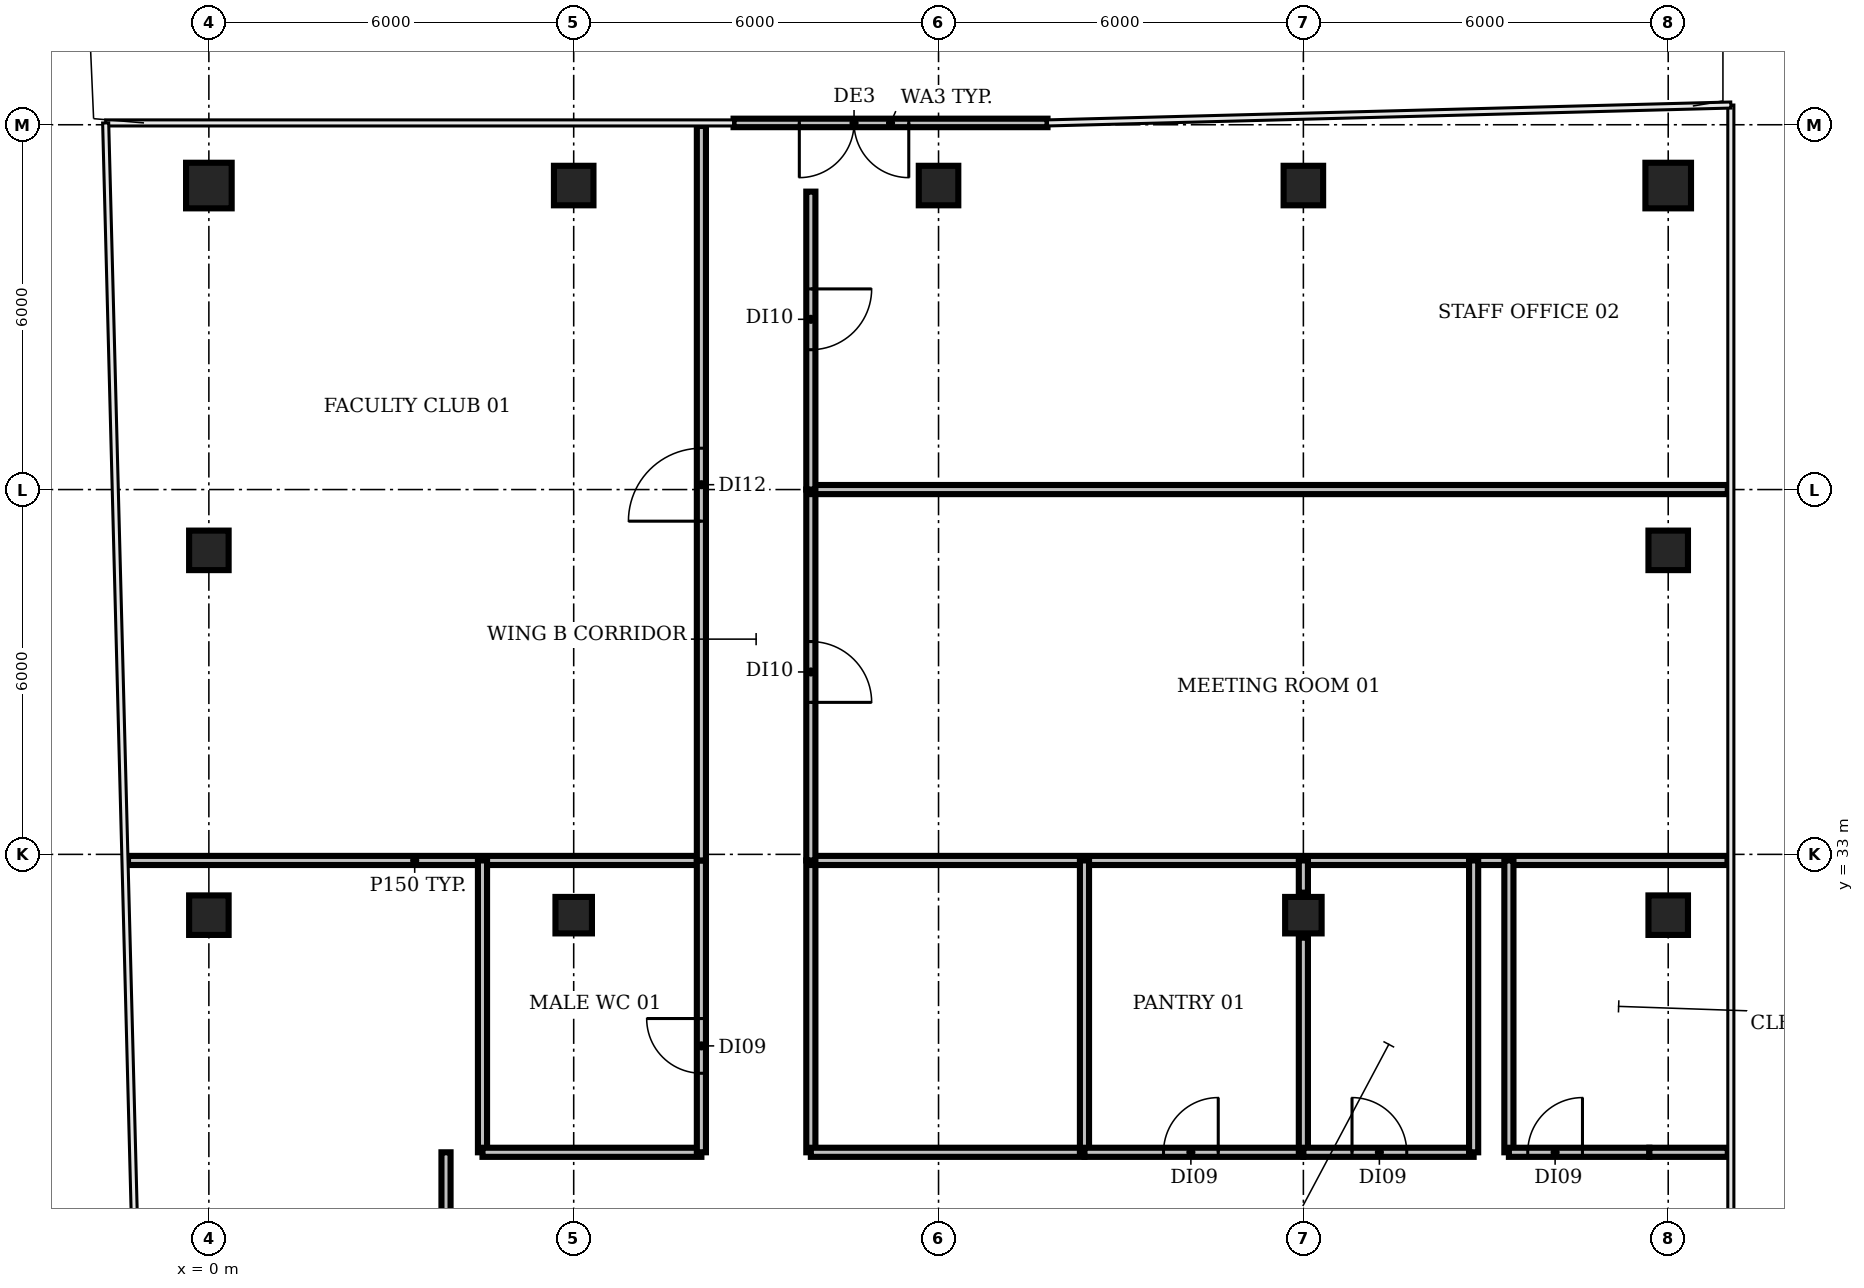
"""IFC4 building model, lengths in metres.
Left out: names, types, materials, properties, quantities, classifications, styles, units other than length and angle.
Written with IfcOpenShell. Run it as: python <this file> out.ifc"""

import sys

from ifc_helpers import new_model, si_unit, direction, frame, frame_2d, origin, origin_2d, place, context, subcontext, project, spatial, rectangle, circle, extrude, element, fill, save


model = new_model("IFC4")
c1 = context("Model", 3, precision=1e-05, world=origin(), true_north=direction((0.0, 1.0)))
c2 = subcontext(c1, "Body", "Model", "MODEL_VIEW")
j1 = project(units=[si_unit("LENGTHUNIT", "METRE"), si_unit("PLANEANGLEUNIT", "RADIAN")], contexts=[c1])
p1 = place(None, origin())
s1 = spatial("IfcSite", under=j1, at=p1, CompositionType="ELEMENT")
p2 = place(p1, origin())
s2 = spatial("IfcBuilding", under=s1, at=p2, CompositionType="ELEMENT")
p3 = place(p2, frame((0.0, 0.0, 327.2)))
s3 = spatial("IfcBuildingStorey", under=s2, at=p3, CompositionType="ELEMENT", Elevation=327.2)
for number, where, z_axis, x_axis in (
    (1, (0.0, 32.0, 0.0), (0.0, 0.0, 1.0), (1.0, 0.0, 0.0)),
    (2, (0.0, 38.0, 0.0), (0.0, 0.0, 1.0), (1.0, 0.0, 0.0)),
):
    element("IfcColumn", number, at=place(p3, frame(where, z_axis=z_axis, x_axis=x_axis)), inside=s3, PredefinedType="COLUMN", context=c2, shape_type="SweptSolid", body=[
        extrude(rectangle(XDim=0.65, YDim=0.65, at=origin_2d()), origin(), (0.0, 0.0, 1.0), 3.9),
    ])
p4 = place(p3, frame((0.0, 44.0, 0.0), z_axis=(0.0, 0.0, 1.0), x_axis=(1.0, 0.0, 0.0)))
e3 = element("IfcColumn", 3, at=p4, inside=s3, PredefinedType="COLUMN", context=c2, shape_type="SweptSolid", body=[
    extrude(circle(Radius=0.375, at=origin_2d()), origin(), (0.0, 0.0, 1.0), 3.9),
])
p5 = place(p3, frame((6.0, 32.0, 0.0), z_axis=(0.0, 0.0, 1.0), x_axis=(1.0, 0.0, 0.0)))
e4 = element("IfcColumn", 4, at=p5, inside=s3, PredefinedType="COLUMN", context=c2, shape_type="SweptSolid", body=[
    extrude(rectangle(XDim=0.6, YDim=0.6, at=origin_2d()), origin(), (0.0, 0.0, 1.0), 3.9),
])
for number, where, z_axis, x_axis in (
    (5, (6.0, 44.0, 0.0), (0.0, 0.0, 1.0), (1.0, 0.0, 0.0)),
    (6, (12.0, 44.0, 0.0), (0.0, 0.0, 1.0), (1.0, 0.0, 0.0)),
):
    element("IfcColumn", number, at=place(p3, frame(where, z_axis=z_axis, x_axis=x_axis)), inside=s3, PredefinedType="COLUMN", context=c2, shape_type="SweptSolid", body=[
        extrude(rectangle(XDim=0.65, YDim=0.65, at=origin_2d()), origin(), (0.0, 0.0, 1.0), 3.9),
    ])
p6 = place(p3, frame((18.0, 32.0, 0.0), z_axis=(0.0, 0.0, 1.0), x_axis=(1.0, 0.0, 0.0)))
e7 = element("IfcColumn", 7, at=p6, inside=s3, PredefinedType="COLUMN", context=c2, shape_type="SweptSolid", body=[
    extrude(rectangle(XDim=0.6, YDim=0.6, at=origin_2d()), origin(), (0.0, 0.0, 1.0), 3.9),
])
for number, where, z_axis, x_axis in (
    (8, (18.0, 44.0, 0.0), (0.0, 0.0, 1.0), (1.0, 0.0, 0.0)),
    (9, (24.0, 32.0, 0.0), (0.0, 0.0, 1.0), (1.0, 0.0, 0.0)),
    (10, (24.0, 38.0, 0.0), (0.0, 0.0, 1.0), (1.0, 0.0, 0.0)),
):
    element("IfcColumn", number, at=place(p3, frame(where, z_axis=z_axis, x_axis=x_axis)), inside=s3, PredefinedType="COLUMN", context=c2, shape_type="SweptSolid", body=[
        extrude(rectangle(XDim=0.65, YDim=0.65, at=origin_2d()), origin(), (0.0, 0.0, 1.0), 3.9),
    ])
p7 = place(p3, frame((24.0, 44.0, 0.0), z_axis=(0.0, 0.0, 1.0), x_axis=(1.0, 0.0, 0.0)))
e11 = element("IfcColumn", 11, at=p7, inside=s3, PredefinedType="COLUMN", context=c2, shape_type="SweptSolid", body=[
    extrude(circle(Radius=0.375, at=origin_2d()), origin(), (0.0, 0.0, 1.0), 3.9),
])
p8 = place(p3, frame((13.792, 45.03, 0.0), z_axis=(0.0, 0.0, 1.0), x_axis=(-1.0, 0.0, 0.0)))
e12 = element("IfcWall", 12, at=p8, inside=s3, PredefinedType="SOLIDWALL", context=c2, shape_type="SweptSolid", body=[
    extrude(rectangle(XDim=5.163, YDim=0.14, at=frame_2d((2.582, 0.0))), origin(), (0.0, 0.0, 1.0), 3.9),
])
p9 = place(p8, frame((2.281, 0.0, 0.0)))
e13 = element("IfcOpeningElement", 13, at=p9, cuts=e12, PredefinedType="OPENING", context=c2, shape_type="SweptSolid", body=[
    extrude(rectangle(XDim=1.8, YDim=2.4, at=frame_2d((0.9, 1.2))), frame((0.0, 0.08, 0.0), z_axis=(0.0, -1.0, 0.0), x_axis=(1.0, 0.0, 0.0)), (0.0, 0.0, 1.0), 0.16),
])
p10 = place(p3, frame((-1.33, 32.9, 0.0), z_axis=(0.0, 0.0, 1.0), x_axis=(1.0, 0.0, 0.0)))
e14 = element("IfcWall", 14, at=p10, inside=s3, PredefinedType="PARTITIONING", context=c2, shape_type="SweptSolid", body=[
    extrude(rectangle(XDim=9.43, YDim=0.15, at=frame_2d((4.715, 0.0))), origin(), (0.0, 0.0, 1.0), 2.95),
])
p11 = place(p3, frame((3.9, 22.5, 0.0), z_axis=(0.0, 0.0, 1.0), x_axis=(0.0, 1.0, 0.0)))
e15 = element("IfcWall", 15, at=p11, inside=s3, PredefinedType="PARTITIONING", context=c2, shape_type="SweptSolid", body=[
    extrude(rectangle(XDim=5.6, YDim=0.15, at=frame_2d((2.8, 0.0))), origin(), (0.0, 0.0, 1.0), 2.95),
])
p12 = place(p3, frame((4.5, 28.1, 0.0), z_axis=(0.0, 0.0, 1.0), x_axis=(0.0, 1.0, 0.0)))
e16 = element("IfcWall", 16, at=p12, inside=s3, PredefinedType="PARTITIONING", context=c2, shape_type="SweptSolid", body=[
    extrude(rectangle(XDim=4.8, YDim=0.15, at=frame_2d((2.4, 0.0))), origin(), (0.0, 0.0, 1.0), 2.95),
])
p13 = place(p3, frame((4.5, 28.1, 0.0), z_axis=(0.0, 0.0, 1.0), x_axis=(1.0, 0.0, 0.0)))
e17 = element("IfcWall", 17, at=p13, inside=s3, PredefinedType="PARTITIONING", context=c2, shape_type="SweptSolid", body=[
    extrude(rectangle(XDim=3.6, YDim=0.15, at=frame_2d((1.8, 0.0))), origin(), (0.0, 0.0, 1.0), 2.95),
])
p14 = place(p3, frame((8.1, 28.1, 0.0), z_axis=(0.0, 0.0, 1.0), x_axis=(0.0, 1.0, 0.0)))
e18 = element("IfcWall", 18, at=p14, inside=s3, PredefinedType="PARTITIONING", context=c2, shape_type="SweptSolid", body=[
    extrude(rectangle(XDim=4.8, YDim=0.15, at=frame_2d((2.4, 0.0))), origin(), (0.0, 0.0, 1.0), 2.95),
])
p15 = place(p14, frame((1.3, 0.0, 0.0)))
e19 = element("IfcOpeningElement", 19, at=p15, cuts=e18, PredefinedType="OPENING", context=c2, shape_type="SweptSolid", body=[
    extrude(rectangle(XDim=0.9, YDim=2.1, at=frame_2d((0.45, 1.05))), frame((0.0, 0.085, 0.0), z_axis=(0.0, -1.0, 0.0), x_axis=(1.0, 0.0, 0.0)), (0.0, 0.0, 1.0), 0.17),
])
p16 = place(p3, frame((8.1, 32.9, 0.0), z_axis=(0.0, 0.0, 1.0), x_axis=(0.0, 1.0, 0.0)))
e20 = element("IfcWall", 20, at=p16, inside=s3, PredefinedType="PARTITIONING", context=c2, shape_type="SweptSolid", body=[
    extrude(rectangle(XDim=12.08, YDim=0.15, at=frame_2d((6.04, 0.0))), origin(), (0.0, 0.0, 1.0), 2.95),
])
p17 = place(p16, frame((5.58, 0.0, 0.0)))
e21 = element("IfcOpeningElement", 21, at=p17, cuts=e20, PredefinedType="OPENING", context=c2, shape_type="SweptSolid", body=[
    extrude(rectangle(XDim=1.2, YDim=2.1, at=frame_2d((0.6, 1.05))), frame((0.0, 0.085, 0.0), z_axis=(0.0, -1.0, 0.0), x_axis=(1.0, 0.0, 0.0)), (0.0, 0.0, 1.0), 0.17),
])
p18 = place(p3, frame((9.9, 28.1, 0.0), z_axis=(0.0, 0.0, 1.0), x_axis=(0.0, 1.0, 0.0)))
e22 = element("IfcWall", 22, at=p18, inside=s3, PredefinedType="PARTITIONING", context=c2, shape_type="SweptSolid", body=[
    extrude(rectangle(XDim=4.8, YDim=0.15, at=frame_2d((2.4, 0.0))), origin(), (0.0, 0.0, 1.0), 2.95),
])
p19 = place(p3, frame((9.9, 28.1, 0.0), z_axis=(0.0, 0.0, 1.0), x_axis=(1.0, 0.0, 0.0)))
e23 = element("IfcWall", 23, at=p19, inside=s3, PredefinedType="PARTITIONING", context=c2, shape_type="SweptSolid", body=[
    extrude(rectangle(XDim=4.5, YDim=0.15, at=frame_2d((2.25, 0.0))), origin(), (0.0, 0.0, 1.0), 2.95),
])
p20 = place(p3, frame((9.9, 32.9, 0.0), z_axis=(0.0, 0.0, 1.0), x_axis=(1.0, 0.0, 0.0)))
e24 = element("IfcWall", 24, at=p20, inside=s3, PredefinedType="PARTITIONING", context=c2, shape_type="SweptSolid", body=[
    extrude(rectangle(XDim=15.075, YDim=0.15, at=frame_2d((7.538, 0.0))), origin(), (0.0, 0.0, 1.0), 2.95),
])
p21 = place(p3, frame((9.9, 39.0, 0.0), z_axis=(0.0, 0.0, 1.0), x_axis=(0.0, -1.0, 0.0)))
e25 = element("IfcWall", 25, at=p21, inside=s3, PredefinedType="PARTITIONING", context=c2, shape_type="SweptSolid", body=[
    extrude(rectangle(XDim=6.1, YDim=0.15, at=frame_2d((3.05, 0.0))), origin(), (0.0, 0.0, 1.0), 2.95),
])
p22 = place(p21, frame((2.5, 0.0, 0.0)))
e26 = element("IfcOpeningElement", 26, at=p22, cuts=e25, PredefinedType="OPENING", context=c2, shape_type="SweptSolid", body=[
    extrude(rectangle(XDim=1.0, YDim=2.1, at=frame_2d((0.5, 1.05))), frame((0.0, 0.085, 0.0), z_axis=(0.0, -1.0, 0.0), x_axis=(1.0, 0.0, 0.0)), (0.0, 0.0, 1.0), 0.17),
])
p23 = place(p3, frame((9.9, 39.0, 0.0), z_axis=(0.0, 0.0, 1.0), x_axis=(1.0, 0.0, 0.0)))
e27 = element("IfcWall", 27, at=p23, inside=s3, PredefinedType="PARTITIONING", context=c2, shape_type="SweptSolid", body=[
    extrude(rectangle(XDim=15.08, YDim=0.15, at=frame_2d((7.54, 0.0))), origin(), (0.0, 0.0, 1.0), 2.95),
])
p24 = place(p3, frame((9.9, 43.9, 0.0), z_axis=(0.0, 0.0, 1.0), x_axis=(0.0, -1.0, 0.0)))
e28 = element("IfcWall", 28, at=p24, inside=s3, PredefinedType="PARTITIONING", context=c2, shape_type="SweptSolid", body=[
    extrude(rectangle(XDim=4.9, YDim=0.15, at=frame_2d((2.45, 0.0))), origin(), (0.0, 0.0, 1.0), 2.95),
])
p25 = place(p24, frame((1.6, 0.0, 0.0)))
e29 = element("IfcOpeningElement", 29, at=p25, cuts=e28, PredefinedType="OPENING", context=c2, shape_type="SweptSolid", body=[
    extrude(rectangle(XDim=1.0, YDim=2.1, at=frame_2d((0.5, 1.05))), frame((0.0, 0.085, 0.0), z_axis=(0.0, -1.0, 0.0), x_axis=(1.0, 0.0, 0.0)), (0.0, 0.0, 1.0), 0.17),
])
p26 = place(p3, frame((14.4, 28.1, 0.0), z_axis=(0.0, 0.0, 1.0), x_axis=(0.0, 1.0, 0.0)))
e30 = element("IfcWall", 30, at=p26, inside=s3, PredefinedType="PARTITIONING", context=c2, shape_type="SweptSolid", body=[
    extrude(rectangle(XDim=4.8, YDim=0.15, at=frame_2d((2.4, 0.0))), origin(), (0.0, 0.0, 1.0), 2.95),
])
p27 = place(p3, frame((14.4, 28.1, 0.0), z_axis=(0.0, 0.0, 1.0), x_axis=(1.0, 0.0, 0.0)))
e31 = element("IfcWall", 31, at=p27, inside=s3, PredefinedType="PARTITIONING", context=c2, shape_type="SweptSolid", body=[
    extrude(rectangle(XDim=3.6, YDim=0.15, at=frame_2d((1.8, 0.0))), origin(), (0.0, 0.0, 1.0), 2.95),
])
p28 = place(p27, frame((1.3, 0.0, 0.0)))
e32 = element("IfcOpeningElement", 32, at=p28, cuts=e31, PredefinedType="OPENING", context=c2, shape_type="SweptSolid", body=[
    extrude(rectangle(XDim=0.9, YDim=2.1, at=frame_2d((0.45, 1.05))), frame((0.0, 0.085, 0.0), z_axis=(0.0, -1.0, 0.0), x_axis=(1.0, 0.0, 0.0)), (0.0, 0.0, 1.0), 0.17),
])
p29 = place(p3, frame((18.0, 28.1, 0.0), z_axis=(0.0, 0.0, 1.0), x_axis=(0.0, 1.0, 0.0)))
e33 = element("IfcWall", 33, at=p29, inside=s3, PredefinedType="PARTITIONING", context=c2, shape_type="SweptSolid", body=[
    extrude(rectangle(XDim=3.53, YDim=0.15, at=frame_2d((1.765, 0.0))), origin(), (0.0, 0.0, 1.0), 2.95),
])
p30 = place(p3, frame((18.0, 28.1, 0.0), z_axis=(0.0, 0.0, 1.0), x_axis=(1.0, 0.0, 0.0)))
e34 = element("IfcWall", 34, at=p30, inside=s3, PredefinedType="PARTITIONING", context=c2, shape_type="SweptSolid", body=[
    extrude(rectangle(XDim=2.8, YDim=0.15, at=frame_2d((1.4, 0.0))), origin(), (0.0, 0.0, 1.0), 2.95),
])
p31 = place(p30, frame((0.8, 0.0, 0.0)))
e35 = element("IfcOpeningElement", 35, at=p31, cuts=e34, PredefinedType="OPENING", context=c2, shape_type="SweptSolid", body=[
    extrude(rectangle(XDim=0.9, YDim=2.1, at=frame_2d((0.45, 1.05))), frame((0.0, 0.085, 0.0), z_axis=(0.0, -1.0, 0.0), x_axis=(1.0, 0.0, 0.0)), (0.0, 0.0, 1.0), 0.17),
])
p32 = place(p3, frame((18.0, 31.736, 0.0), z_axis=(0.0, 0.0, 1.0), x_axis=(0.0, 1.0, 0.0)))
e36 = element("IfcWall", 36, at=p32, inside=s3, PredefinedType="PARTITIONING", context=c2, shape_type="SweptSolid", body=[
    extrude(rectangle(XDim=0.529, YDim=0.15, at=frame_2d((0.264, 0.0))), origin(), (0.0, 0.0, 1.0), 2.95),
])
p33 = place(p3, frame((18.0, 32.37, 0.0), z_axis=(0.0, 0.0, 1.0), x_axis=(0.0, 1.0, 0.0)))
e37 = element("IfcWall", 37, at=p33, inside=s3, PredefinedType="PARTITIONING", context=c2, shape_type="SweptSolid", body=[
    extrude(rectangle(XDim=0.53, YDim=0.15, at=frame_2d((0.265, 0.0))), origin(), (0.0, 0.0, 1.0), 2.95),
])
for number, where, z_axis, x_axis in (
    (38, (20.8, 28.1, 0.0), (0.0, 0.0, 1.0), (0.0, 1.0, 0.0)),
    (39, (21.38, 28.1, 0.0), (0.0, 0.0, 1.0), (0.0, 1.0, 0.0)),
):
    element("IfcWall", number, at=place(p3, frame(where, z_axis=z_axis, x_axis=x_axis)), inside=s3, PredefinedType="PARTITIONING", context=c2, shape_type="SweptSolid", body=[
        extrude(rectangle(XDim=4.8, YDim=0.15, at=frame_2d((2.4, 0.0))), origin(), (0.0, 0.0, 1.0), 2.95),
    ])
p34 = place(p3, frame((21.38, 28.1, 0.0), z_axis=(0.0, 0.0, 1.0), x_axis=(1.0, 0.0, 0.0)))
e40 = element("IfcWall", 40, at=p34, inside=s3, PredefinedType="PARTITIONING", context=c2, shape_type="SweptSolid", body=[
    extrude(rectangle(XDim=2.31, YDim=0.15, at=frame_2d((1.155, 0.0))), origin(), (0.0, 0.0, 1.0), 2.95),
])
p35 = place(p34, frame((0.31, 0.0, 0.0)))
e41 = element("IfcOpeningElement", 41, at=p35, cuts=e40, PredefinedType="OPENING", context=c2, shape_type="SweptSolid", body=[
    extrude(rectangle(XDim=0.9, YDim=2.1, at=frame_2d((0.45, 1.05))), frame((0.0, 0.085, 0.0), z_axis=(0.0, -1.0, 0.0), x_axis=(1.0, 0.0, 0.0)), (0.0, 0.0, 1.0), 0.17),
])
p36 = place(p3, frame((23.69, 28.1, 0.0), z_axis=(0.0, 0.0, 1.0), x_axis=(1.0, 0.0, 0.0)))
e42 = element("IfcWall", 42, at=p36, inside=s3, PredefinedType="PARTITIONING", context=c2, shape_type="SweptSolid", body=[
    extrude(rectangle(XDim=1.29, YDim=0.15, at=frame_2d((0.645, 0.0))), origin(), (0.0, 0.0, 1.0), 2.95),
])
p37 = place(p9, origin())
e43 = element("IfcDoor", 43, at=p37, inside=s3, OperationType="DOUBLE_DOOR_DOUBLE_SWING", PredefinedType="DOOR", context=c2, shape_type="SweptSolid", body=[
    extrude(rectangle(XDim=1.8, YDim=2.4, at=frame_2d((0.9, 1.2))), frame((0.0, 0.025, 0.0), z_axis=(0.0, -1.0, 0.0), x_axis=(1.0, 0.0, 0.0)), (0.0, 0.0, 1.0), 0.05),
])
fill(e13, e43)
p38 = place(p15, origin())
e44 = element("IfcDoor", 44, at=p38, inside=s3, OperationType="SINGLE_SWING_RIGHT", PredefinedType="DOOR", context=c2, shape_type="SweptSolid", body=[
    extrude(rectangle(XDim=0.9, YDim=2.1, at=frame_2d((0.45, 1.05))), frame((0.0, 0.025, 0.0), z_axis=(0.0, -1.0, 0.0), x_axis=(1.0, 0.0, 0.0)), (0.0, 0.0, 1.0), 0.05),
])
fill(e19, e44)
p39 = place(p17, origin())
e45 = element("IfcDoor", 45, at=p39, inside=s3, OperationType="SINGLE_SWING_LEFT", PredefinedType="DOOR", context=c2, shape_type="SweptSolid", body=[
    extrude(rectangle(XDim=1.2, YDim=2.1, at=frame_2d((0.6, 1.05))), frame((0.0, 0.025, 0.0), z_axis=(0.0, -1.0, 0.0), x_axis=(1.0, 0.0, 0.0)), (0.0, 0.0, 1.0), 0.05),
])
fill(e21, e45)
p40 = place(p22, origin())
e46 = element("IfcDoor", 46, at=p40, inside=s3, OperationType="SINGLE_SWING_RIGHT", PredefinedType="DOOR", context=c2, shape_type="SweptSolid", body=[
    extrude(rectangle(XDim=1.0, YDim=2.1, at=frame_2d((0.5, 1.05))), frame((0.0, 0.025, 0.0), z_axis=(0.0, -1.0, 0.0), x_axis=(1.0, 0.0, 0.0)), (0.0, 0.0, 1.0), 0.05),
])
fill(e26, e46)
p41 = place(p25, origin())
e47 = element("IfcDoor", 47, at=p41, inside=s3, OperationType="SINGLE_SWING_LEFT", PredefinedType="DOOR", context=c2, shape_type="SweptSolid", body=[
    extrude(rectangle(XDim=1.0, YDim=2.1, at=frame_2d((0.5, 1.05))), frame((0.0, 0.025, 0.0), z_axis=(0.0, -1.0, 0.0), x_axis=(1.0, 0.0, 0.0)), (0.0, 0.0, 1.0), 0.05),
])
fill(e29, e47)
p42 = place(p28, origin())
e48 = element("IfcDoor", 48, at=p42, inside=s3, OperationType="SINGLE_SWING_RIGHT", PredefinedType="DOOR", context=c2, shape_type="SweptSolid", body=[
    extrude(rectangle(XDim=0.9, YDim=2.1, at=frame_2d((0.45, 1.05))), frame((0.0, 0.025, 0.0), z_axis=(0.0, -1.0, 0.0), x_axis=(1.0, 0.0, 0.0)), (0.0, 0.0, 1.0), 0.05),
])
fill(e32, e48)
p43 = place(p31, origin())
e49 = element("IfcDoor", 49, at=p43, inside=s3, OperationType="SINGLE_SWING_LEFT", PredefinedType="DOOR", context=c2, shape_type="SweptSolid", body=[
    extrude(rectangle(XDim=0.9, YDim=2.1, at=frame_2d((0.45, 1.05))), frame((0.0, 0.025, 0.0), z_axis=(0.0, -1.0, 0.0), x_axis=(1.0, 0.0, 0.0)), (0.0, 0.0, 1.0), 0.05),
])
fill(e35, e49)
p44 = place(p35, origin())
e50 = element("IfcDoor", 50, at=p44, inside=s3, OperationType="SINGLE_SWING_RIGHT", PredefinedType="DOOR", context=c2, shape_type="SweptSolid", body=[
    extrude(rectangle(XDim=0.9, YDim=2.1, at=frame_2d((0.45, 1.05))), frame((0.0, 0.025, 0.0), z_axis=(0.0, -1.0, 0.0), x_axis=(1.0, 0.0, 0.0)), (0.0, 0.0, 1.0), 0.05),
])
fill(e41, e50)
save(model, sys.argv[1])
